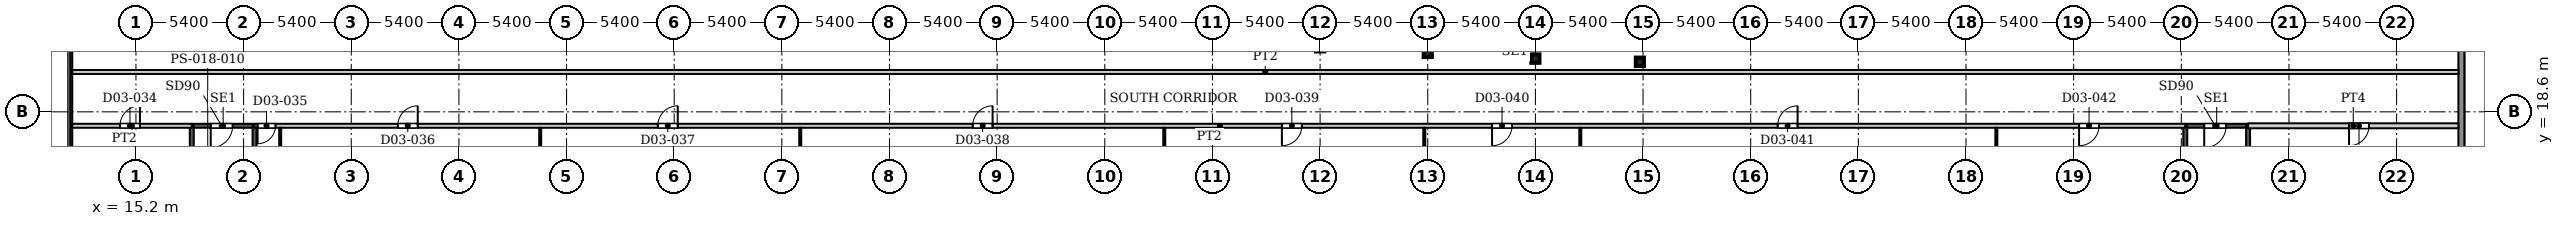
"""IFC4 building model, lengths in metres.
Left out: names, types, materials, properties, quantities, classifications, styles, units other than length and angle.
Written with IfcOpenShell. Run it as: python <this file> out.ifc"""

import sys

from ifc_helpers import new_model, si_unit, direction, frame, frame_2d, origin, origin_2d, place, context, subcontext, project, spatial, rectangle, i_section, extrude, source, transform, mapped, element, fill, save


model = new_model("IFC4")
c1 = context("Model", 3, precision=1e-05, world=origin(), true_north=direction((0.0, 1.0)))
c2 = subcontext(c1, "Body", "Model", "MODEL_VIEW")
j1 = project(units=[si_unit("LENGTHUNIT", "METRE"), si_unit("PLANEANGLEUNIT", "RADIAN")], contexts=[c1])
p1 = place(None, origin())
s1 = spatial("IfcSite", under=j1, at=p1, CompositionType="ELEMENT")
p2 = place(p1, origin())
s2 = spatial("IfcBuilding", under=s1, at=p2, CompositionType="ELEMENT")
p3 = place(p2, frame((0.0, 0.0, 17.0)))
s3 = spatial("IfcBuildingStorey", under=s2, at=p3, CompositionType="ELEMENT", Elevation=17.0)
for number, where, z_axis, x_axis in (
    (1, (90.64, 21.11, 0.0), (0.0, 0.0, 1.0), (1.0, 0.0, 0.0)),
    (2, (85.4, 21.27, 0.0), (0.0, 0.0, 1.0), (1.0, 0.0, 0.0)),
    (3, (80.0, 21.56, 0.0), (0.0, 0.0, 1.0), (1.0, 0.0, 0.0)),
):
    element("IfcColumn", number, at=place(p3, frame(where, z_axis=z_axis, x_axis=x_axis)), inside=s3, PredefinedType="COLUMN", context=c2, shape_type="SweptSolid", body=[
        extrude(i_section(OverallWidth=0.409, OverallDepth=0.425, WebThickness=0.033, FlangeThickness=0.052, FilletRadius=0.013, at=origin_2d()), origin(), (0.0, 0.0, 1.0), 4.5),
    ])
p4 = place(p3, frame((131.85, 54.72, 0.0), z_axis=(0.0, 0.0, 1.0), x_axis=(0.0, -1.0, 0.0)))
e4 = element("IfcWall", 4, at=p4, inside=s3, PredefinedType="SOLIDWALL", context=c2, shape_type="SweptSolid", body=[
    extrude(rectangle(XDim=38.72, YDim=0.3, at=frame_2d((19.36, 0.0))), origin(), (0.0, 0.0, 1.0), 4.25),
])
p5 = place(p4, frame((2.435, 0.0, 0.9)))
e5 = element("IfcOpeningElement", 5, at=p5, cuts=e4, PredefinedType="OPENING", context=c2, shape_type="SweptSolid", body=[
    extrude(rectangle(XDim=2.7, YDim=2.1, at=frame_2d((1.35, 1.05))), frame((0.0, 0.16, 0.0), z_axis=(0.0, -1.0, 0.0), x_axis=(1.0, 0.0, 0.0)), (0.0, 0.0, 1.0), 0.32),
])
p6 = place(p4, frame((13.58, 0.0, 0.9)))
e6 = element("IfcOpeningElement", 6, at=p6, cuts=e4, PredefinedType="OPENING", context=c2, shape_type="SweptSolid", body=[
    extrude(rectangle(XDim=2.7, YDim=2.1, at=frame_2d((1.35, 1.05))), frame((0.0, 0.16, 0.0), z_axis=(0.0, -1.0, 0.0), x_axis=(1.0, 0.0, 0.0)), (0.0, 0.0, 1.0), 0.32),
])
p7 = place(p4, frame((26.16, 0.0, 0.9)))
e7 = element("IfcOpeningElement", 7, at=p7, cuts=e4, PredefinedType="OPENING", context=c2, shape_type="SweptSolid", body=[
    extrude(rectangle(XDim=2.7, YDim=2.1, at=frame_2d((1.35, 1.05))), frame((0.0, 0.16, 0.0), z_axis=(0.0, -1.0, 0.0), x_axis=(1.0, 0.0, 0.0)), (0.0, 0.0, 1.0), 0.32),
])
p8 = place(p3, frame((18.0, 17.9, 0.0), z_axis=(0.0, 0.0, 1.0), x_axis=(1.0, 0.0, 0.0)))
e8 = element("IfcWall", 8, at=p8, inside=s3, PredefinedType="SHEAR", context=c2, shape_type="SweptSolid", body=[
    extrude(rectangle(XDim=3.15, YDim=0.2, at=frame_2d((1.575, 0.0))), origin(), (0.0, 0.0, 1.0), 4.5),
])
p9 = place(p8, frame((0.95, 0.0, 0.0)))
e9 = element("IfcOpeningElement", 9, at=p9, cuts=e8, PredefinedType="OPENING", context=c2, shape_type="SweptSolid", body=[
    extrude(rectangle(XDim=1.1, YDim=2.2, at=frame_2d((0.55, 1.1))), frame((0.0, 0.11, 0.0), z_axis=(0.0, -1.0, 0.0), x_axis=(1.0, 0.0, 0.0)), (0.0, 0.0, 1.0), 0.22),
])
p10 = place(p3, frame((18.0, 11.2, 0.0), z_axis=(0.0, 0.0, 1.0), x_axis=(0.0, 1.0, 0.0)))
e10 = element("IfcWall", 10, at=p10, inside=s3, PredefinedType="SHEAR", context=c2, shape_type="SweptSolid", body=[
    extrude(rectangle(XDim=6.7, YDim=0.2, at=frame_2d((3.35, 0.0))), origin(), (0.0, 0.0, 1.0), 4.5),
])
p11 = place(p3, frame((21.15, 10.0, 0.0), z_axis=(0.0, 0.0, 1.0), x_axis=(0.0, 1.0, 0.0)))
e11 = element("IfcWall", 11, at=p11, inside=s3, PredefinedType="SHEAR", context=c2, shape_type="SweptSolid", body=[
    extrude(rectangle(XDim=7.9, YDim=0.2, at=frame_2d((3.95, 0.0))), origin(), (0.0, 0.0, 1.0), 4.5),
])
p12 = place(p3, frame((118.0, 17.9, 0.0), z_axis=(0.0, 0.0, 1.0), x_axis=(1.0, 0.0, 0.0)))
e12 = element("IfcWall", 12, at=p12, inside=s3, PredefinedType="SHEAR", context=c2, shape_type="SweptSolid", body=[
    extrude(rectangle(XDim=3.15, YDim=0.2, at=frame_2d((1.575, 0.0))), origin(), (0.0, 0.0, 1.0), 4.5),
])
p13 = place(p12, frame((0.95, 0.0, 0.0)))
e13 = element("IfcOpeningElement", 13, at=p13, cuts=e12, PredefinedType="OPENING", context=c2, shape_type="SweptSolid", body=[
    extrude(rectangle(XDim=1.1, YDim=2.2, at=frame_2d((0.55, 1.1))), frame((0.0, 0.11, 0.0), z_axis=(0.0, -1.0, 0.0), x_axis=(1.0, 0.0, 0.0)), (0.0, 0.0, 1.0), 0.22),
])
p14 = place(p3, frame((118.0, 11.2, 0.0), z_axis=(0.0, 0.0, 1.0), x_axis=(0.0, 1.0, 0.0)))
e14 = element("IfcWall", 14, at=p14, inside=s3, PredefinedType="SHEAR", context=c2, shape_type="SweptSolid", body=[
    extrude(rectangle(XDim=6.7, YDim=0.2, at=frame_2d((3.35, 0.0))), origin(), (0.0, 0.0, 1.0), 4.5),
])
p15 = place(p3, frame((121.15, 10.0, 0.0), z_axis=(0.0, 0.0, 1.0), x_axis=(0.0, 1.0, 0.0)))
e15 = element("IfcWall", 15, at=p15, inside=s3, PredefinedType="SHEAR", context=c2, shape_type="SweptSolid", body=[
    extrude(rectangle(XDim=7.9, YDim=0.2, at=frame_2d((3.95, 0.0))), origin(), (0.0, 0.0, 1.0), 4.5),
])
p16 = place(p3, frame((12.0, 17.9, 0.0), z_axis=(0.0, 0.0, 1.0), x_axis=(1.0, 0.0, 0.0)))
e16 = element("IfcWall", 16, at=p16, inside=s3, PredefinedType="PARTITIONING", context=c2, shape_type="SweptSolid", body=[
    extrude(rectangle(XDim=6.0, YDim=0.2, at=frame_2d((3.0, 0.0))), origin(), (0.0, 0.0, 1.0), 4.18),
])
p17 = place(p16, frame((2.4, 0.0, 0.0)))
e17 = element("IfcOpeningElement", 17, at=p17, cuts=e16, PredefinedType="OPENING", context=c2, shape_type="SweptSolid", body=[
    extrude(rectangle(XDim=1.0, YDim=2.1, at=frame_2d((0.5, 1.05))), frame((0.0, 0.11, 0.0), z_axis=(0.0, -1.0, 0.0), x_axis=(1.0, 0.0, 0.0)), (0.0, 0.0, 1.0), 0.22),
])
p18 = place(p3, frame((12.0, 20.6, 0.0), z_axis=(0.0, 0.0, 1.0), x_axis=(1.0, 0.0, 0.0)))
e18 = element("IfcWall", 18, at=p18, inside=s3, PredefinedType="PARTITIONING", context=c2, shape_type="SweptSolid", body=[
    extrude(rectangle(XDim=119.701, YDim=0.2, at=frame_2d((59.851, 0.0))), origin(), (0.0, 0.0, 1.0), 4.18),
])
p19 = place(p3, frame((21.15, 17.9, 0.0), z_axis=(0.0, 0.0, 1.0), x_axis=(1.0, 0.0, 0.0)))
e19 = element("IfcWall", 19, at=p19, inside=s3, PredefinedType="PARTITIONING", context=c2, shape_type="SweptSolid", body=[
    extrude(rectangle(XDim=96.85, YDim=0.2, at=frame_2d((48.425, 0.0))), origin(), (0.0, 0.0, 1.0), 4.18),
])
p20 = place(p19, frame((0.15, 0.0, 0.0)))
e20 = element("IfcOpeningElement", 20, at=p20, cuts=e19, PredefinedType="OPENING", context=c2, shape_type="SweptSolid", body=[
    extrude(rectangle(XDim=0.9, YDim=2.1, at=frame_2d((0.45, 1.05))), frame((0.0, 0.11, 0.0), z_axis=(0.0, -1.0, 0.0), x_axis=(1.0, 0.0, 0.0)), (0.0, 0.0, 1.0), 0.22),
])
p21 = place(p19, frame((7.185, 0.0, 0.0)))
e21 = element("IfcOpeningElement", 21, at=p21, cuts=e19, PredefinedType="OPENING", context=c2, shape_type="SweptSolid", body=[
    extrude(rectangle(XDim=1.0, YDim=2.1, at=frame_2d((0.5, 1.05))), frame((0.0, 0.11, 0.0), z_axis=(0.0, -1.0, 0.0), x_axis=(1.0, 0.0, 0.0)), (0.0, 0.0, 1.0), 0.22),
])
p22 = place(p19, frame((20.228, 0.0, 0.0)))
e22 = element("IfcOpeningElement", 22, at=p22, cuts=e19, PredefinedType="OPENING", context=c2, shape_type="SweptSolid", body=[
    extrude(rectangle(XDim=1.0, YDim=2.1, at=frame_2d((0.5, 1.05))), frame((0.0, 0.11, 0.0), z_axis=(0.0, -1.0, 0.0), x_axis=(1.0, 0.0, 0.0)), (0.0, 0.0, 1.0), 0.22),
])
p23 = place(p19, frame((36.022, 0.0, 0.0)))
e23 = element("IfcOpeningElement", 23, at=p23, cuts=e19, PredefinedType="OPENING", context=c2, shape_type="SweptSolid", body=[
    extrude(rectangle(XDim=1.0, YDim=2.1, at=frame_2d((0.5, 1.05))), frame((0.0, 0.11, 0.0), z_axis=(0.0, -1.0, 0.0), x_axis=(1.0, 0.0, 0.0)), (0.0, 0.0, 1.0), 0.22),
])
p24 = place(p19, frame((51.533, 0.0, 0.0)))
e24 = element("IfcOpeningElement", 24, at=p24, cuts=e19, PredefinedType="OPENING", context=c2, shape_type="SweptSolid", body=[
    extrude(rectangle(XDim=1.0, YDim=2.1, at=frame_2d((0.5, 1.05))), frame((0.0, 0.11, 0.0), z_axis=(0.0, -1.0, 0.0), x_axis=(1.0, 0.0, 0.0)), (0.0, 0.0, 1.0), 0.22),
])
p25 = place(p19, frame((62.076, 0.0, 0.0)))
e25 = element("IfcOpeningElement", 25, at=p25, cuts=e19, PredefinedType="OPENING", context=c2, shape_type="SweptSolid", body=[
    extrude(rectangle(XDim=1.0, YDim=2.1, at=frame_2d((0.5, 1.05))), frame((0.0, 0.11, 0.0), z_axis=(0.0, -1.0, 0.0), x_axis=(1.0, 0.0, 0.0)), (0.0, 0.0, 1.0), 0.22),
])
p26 = place(p19, frame((76.402, 0.0, 0.0)))
e26 = element("IfcOpeningElement", 26, at=p26, cuts=e19, PredefinedType="OPENING", context=c2, shape_type="SweptSolid", body=[
    extrude(rectangle(XDim=1.0, YDim=2.1, at=frame_2d((0.5, 1.05))), frame((0.0, 0.11, 0.0), z_axis=(0.0, -1.0, 0.0), x_axis=(1.0, 0.0, 0.0)), (0.0, 0.0, 1.0), 0.22),
])
p27 = place(p19, frame((91.522, 0.0, 0.0)))
e27 = element("IfcOpeningElement", 27, at=p27, cuts=e19, PredefinedType="OPENING", context=c2, shape_type="SweptSolid", body=[
    extrude(rectangle(XDim=1.0, YDim=2.1, at=frame_2d((0.5, 1.05))), frame((0.0, 0.11, 0.0), z_axis=(0.0, -1.0, 0.0), x_axis=(1.0, 0.0, 0.0)), (0.0, 0.0, 1.0), 0.22),
])
for number, where, z_axis, x_axis in (
    (28, (22.435, 10.299, 0.0), (0.0, 0.0, 1.0), (0.0, 1.0, 0.0)),
    (29, (35.478, 10.299, 0.0), (0.0, 0.0, 1.0), (0.0, 1.0, 0.0)),
    (30, (48.522, 10.299, 0.0), (0.0, 0.0, 1.0), (0.0, 1.0, 0.0)),
):
    element("IfcWall", number, at=place(p3, frame(where, z_axis=z_axis, x_axis=x_axis)), inside=s3, PredefinedType="PARTITIONING", context=c2, shape_type="SweptSolid", body=[
        extrude(rectangle(XDim=7.501, YDim=0.1, at=frame_2d((3.75, 0.0))), origin(), (0.0, 0.0, 1.0), 4.18),
    ])
p28 = place(p3, frame((66.783, 10.0, 0.0), z_axis=(0.0, 0.0, 1.0), x_axis=(0.0, 1.0, 0.0)))
e31 = element("IfcWall", 31, at=p28, inside=s3, PredefinedType="PARTITIONING", context=c2, shape_type="SweptSolid", body=[
    extrude(rectangle(XDim=7.8, YDim=0.1, at=frame_2d((3.9, 0.0))), origin(), (0.0, 0.0, 1.0), 4.18),
])
p29 = place(p3, frame((79.826, 10.0, 0.0), z_axis=(0.0, 0.0, 1.0), x_axis=(0.0, 1.0, 0.0)))
e32 = element("IfcWall", 32, at=p29, inside=s3, PredefinedType="PARTITIONING", context=c2, shape_type="SweptSolid", body=[
    extrude(rectangle(XDim=7.8, YDim=0.1, at=frame_2d((3.9, 0.0))), origin(), (0.0, 0.0, 1.0), 3.763),
])
for number, where, z_axis, x_axis in (
    (33, (87.652, 10.0, 0.0), (0.0, 0.0, 1.0), (0.0, 1.0, 0.0)),
    (34, (108.522, 10.0, 0.0), (0.0, 0.0, 1.0), (0.0, 1.0, 0.0)),
):
    element("IfcWall", number, at=place(p3, frame(where, z_axis=z_axis, x_axis=x_axis)), inside=s3, PredefinedType="PARTITIONING", context=c2, shape_type="SweptSolid", body=[
        extrude(rectangle(XDim=7.8, YDim=0.1, at=frame_2d((3.9, 0.0))), origin(), (0.0, 0.0, 1.0), 4.18),
    ])
p30 = place(p3, frame((121.15, 17.9, 0.0), z_axis=(0.0, 0.0, 1.0), x_axis=(1.0, 0.0, 0.0)))
e35 = element("IfcWall", 35, at=p30, inside=s3, PredefinedType="PARTITIONING", context=c2, shape_type="SweptSolid", body=[
    extrude(rectangle(XDim=10.551, YDim=0.25, at=frame_2d((5.275, 0.0))), origin(), (0.0, 0.0, 1.0), 4.18),
])
p31 = place(p30, frame((5.065, 0.0, 0.0)))
e36 = element("IfcOpeningElement", 36, at=p31, cuts=e35, PredefinedType="OPENING", context=c2, shape_type="SweptSolid", body=[
    extrude(rectangle(XDim=1.0, YDim=2.1, at=frame_2d((0.5, 1.05))), frame((0.0, 0.135, 0.0), z_axis=(0.0, -1.0, 0.0), x_axis=(1.0, 0.0, 0.0)), (0.0, 0.0, 1.0), 0.27),
])
m1 = source(origin(), c2, "Body", "SweptSolid", [
    extrude(rectangle(XDim=1.1, YDim=2.2, at=frame_2d((0.55, 1.1))), frame((0.0, 0.025, 0.0), z_axis=(0.0, -1.0, 0.0), x_axis=(1.0, 0.0, 0.0)), (0.0, 0.0, 1.0), 0.05),
])
p32 = place(p9, origin())
e37 = element("IfcDoor", 37, at=p32, inside=s3, OperationType="SINGLE_SWING_RIGHT", PredefinedType="DOOR", context=c2, shape_type="MappedRepresentation", body=[
    mapped(m1, transform((0.0, 0.0, 0.0), x_axis=(1.0, 0.0, 0.0), y_axis=(0.0, 1.0, 0.0), z_axis=(0.0, 0.0, 1.0), scale=1.0)),
])
fill(e9, e37)
p33 = place(p13, origin())
e38 = element("IfcDoor", 38, at=p33, inside=s3, OperationType="SINGLE_SWING_RIGHT", PredefinedType="DOOR", context=c2, shape_type="MappedRepresentation", body=[
    mapped(m1, transform((0.0, 0.0, 0.0), x_axis=(1.0, 0.0, 0.0), y_axis=(0.0, 1.0, 0.0), z_axis=(0.0, 0.0, 1.0), scale=1.0)),
])
fill(e13, e38)
m2 = source(origin(), c2, "Body", "SweptSolid", [
    extrude(rectangle(XDim=1.0, YDim=2.1, at=frame_2d((0.5, 1.05))), frame((0.0, 0.025, 0.0), z_axis=(0.0, -1.0, 0.0), x_axis=(1.0, 0.0, 0.0)), (0.0, 0.0, 1.0), 0.05),
])
p34 = place(p17, origin())
e39 = element("IfcDoor", 39, at=p34, inside=s3, OperationType="SINGLE_SWING_LEFT", PredefinedType="DOOR", context=c2, shape_type="MappedRepresentation", body=[
    mapped(m2, transform((0.0, 0.0, 0.0), x_axis=(1.0, 0.0, 0.0), y_axis=(0.0, 1.0, 0.0), z_axis=(0.0, 0.0, 1.0), scale=1.0)),
])
fill(e17, e39)
m3 = source(origin(), c2, "Body", "SweptSolid", [
    extrude(rectangle(XDim=0.9, YDim=2.1, at=frame_2d((0.45, 1.05))), frame((0.0, 0.025, 0.0), z_axis=(0.0, -1.0, 0.0), x_axis=(1.0, 0.0, 0.0)), (0.0, 0.0, 1.0), 0.05),
])
p35 = place(p20, origin())
e40 = element("IfcDoor", 40, at=p35, inside=s3, OperationType="SINGLE_SWING_RIGHT", PredefinedType="DOOR", context=c2, shape_type="MappedRepresentation", body=[
    mapped(m3, transform((0.0, 0.0, 0.0), x_axis=(1.0, 0.0, 0.0), y_axis=(0.0, 1.0, 0.0), z_axis=(0.0, 0.0, 1.0), scale=1.0)),
])
fill(e20, e40)
p36 = place(p21, origin())
e41 = element("IfcDoor", 41, at=p36, inside=s3, OperationType="SINGLE_SWING_LEFT", PredefinedType="DOOR", context=c2, shape_type="MappedRepresentation", body=[
    mapped(m2, transform((0.0, 0.0, 0.0), x_axis=(1.0, 0.0, 0.0), y_axis=(0.0, 1.0, 0.0), z_axis=(0.0, 0.0, 1.0), scale=1.0)),
])
fill(e21, e41)
p37 = place(p22, origin())
e42 = element("IfcDoor", 42, at=p37, inside=s3, OperationType="SINGLE_SWING_LEFT", PredefinedType="DOOR", context=c2, shape_type="MappedRepresentation", body=[
    mapped(m2, transform((0.0, 0.0, 0.0), x_axis=(1.0, 0.0, 0.0), y_axis=(0.0, 1.0, 0.0), z_axis=(0.0, 0.0, 1.0), scale=1.0)),
])
fill(e22, e42)
p38 = place(p23, origin())
e43 = element("IfcDoor", 43, at=p38, inside=s3, OperationType="SINGLE_SWING_LEFT", PredefinedType="DOOR", context=c2, shape_type="MappedRepresentation", body=[
    mapped(m2, transform((0.0, 0.0, 0.0), x_axis=(1.0, 0.0, 0.0), y_axis=(0.0, 1.0, 0.0), z_axis=(0.0, 0.0, 1.0), scale=1.0)),
])
fill(e23, e43)
p39 = place(p24, origin())
e44 = element("IfcDoor", 44, at=p39, inside=s3, OperationType="SINGLE_SWING_RIGHT", PredefinedType="DOOR", context=c2, shape_type="MappedRepresentation", body=[
    mapped(m2, transform((0.0, 0.0, 0.0), x_axis=(1.0, 0.0, 0.0), y_axis=(0.0, 1.0, 0.0), z_axis=(0.0, 0.0, 1.0), scale=1.0)),
])
fill(e24, e44)
p40 = place(p25, origin())
e45 = element("IfcDoor", 45, at=p40, inside=s3, OperationType="SINGLE_SWING_RIGHT", PredefinedType="DOOR", context=c2, shape_type="MappedRepresentation", body=[
    mapped(m2, transform((0.0, 0.0, 0.0), x_axis=(1.0, 0.0, 0.0), y_axis=(0.0, 1.0, 0.0), z_axis=(0.0, 0.0, 1.0), scale=1.0)),
])
fill(e25, e45)
p41 = place(p26, origin())
e46 = element("IfcDoor", 46, at=p41, inside=s3, OperationType="SINGLE_SWING_LEFT", PredefinedType="DOOR", context=c2, shape_type="MappedRepresentation", body=[
    mapped(m2, transform((0.0, 0.0, 0.0), x_axis=(1.0, 0.0, 0.0), y_axis=(0.0, 1.0, 0.0), z_axis=(0.0, 0.0, 1.0), scale=1.0)),
])
fill(e26, e46)
p42 = place(p27, origin())
e47 = element("IfcDoor", 47, at=p42, inside=s3, OperationType="SINGLE_SWING_RIGHT", PredefinedType="DOOR", context=c2, shape_type="MappedRepresentation", body=[
    mapped(m2, transform((0.0, 0.0, 0.0), x_axis=(1.0, 0.0, 0.0), y_axis=(0.0, 1.0, 0.0), z_axis=(0.0, 0.0, 1.0), scale=1.0)),
])
fill(e27, e47)
m4 = source(origin(), c2, "Body", "SweptSolid", [
    extrude(rectangle(XDim=1.0, YDim=2.1, at=frame_2d((0.5, 1.05))), frame((0.0, 0.025, 0.0), z_axis=(0.0, -1.0, 0.0), x_axis=(1.0, 0.0, 0.0)), (0.0, 0.0, 1.0), 0.05),
])
p43 = place(p31, origin())
e48 = element("IfcDoor", 48, at=p43, inside=s3, OperationType="SINGLE_SWING_RIGHT", PredefinedType="DOOR", context=c2, shape_type="MappedRepresentation", body=[
    mapped(m4, transform((0.0, 0.0, 0.0), x_axis=(1.0, 0.0, 0.0), y_axis=(0.0, 1.0, 0.0), z_axis=(0.0, 0.0, 1.0), scale=1.0)),
])
fill(e36, e48)
save(model, sys.argv[1])
